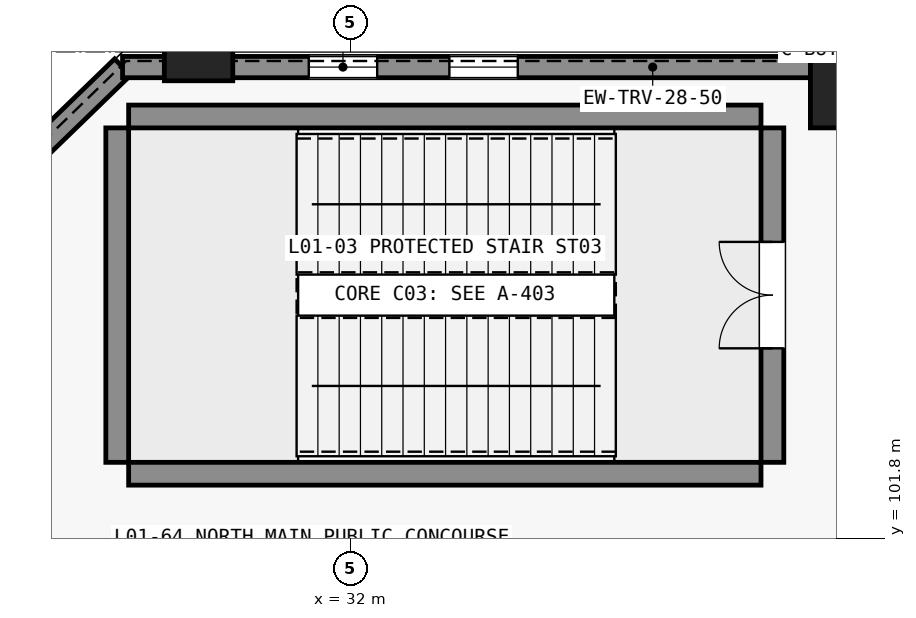
"""IFC4 building model, lengths in metres.
Left out: names, types, materials, properties, quantities, classifications, styles, units other than length and angle.
Written with IfcOpenShell. Run it as: python <this file> out.ifc"""

import sys

from ifc_helpers import new_model, si_unit, direction, frame, frame_2d, origin, origin_2d, place, context, subcontext, project, spatial, rectangle, extrude, element, fill, save


model = new_model("IFC4")
c1 = context("Model", 3, precision=1e-05, world=origin(), true_north=direction((0.0, 1.0)))
c2 = subcontext(c1, "Body", "Model", "MODEL_VIEW")
j1 = project(units=[si_unit("LENGTHUNIT", "METRE"), si_unit("PLANEANGLEUNIT", "RADIAN")], contexts=[c1])
p1 = place(None, origin())
s1 = spatial("IfcSite", under=j1, at=p1, CompositionType="ELEMENT")
p2 = place(p1, origin())
s2 = spatial("IfcBuilding", under=s1, at=p2, CompositionType="ELEMENT")
p3 = place(p2, frame((0.0, 0.0, 6.0)))
s3 = spatial("IfcBuildingStorey", under=s2, at=p3, CompositionType="ELEMENT", Elevation=6.0)
for number, where, z_axis, x_axis in (
    (1, (38.5, 107.8, 0.0), (0.0, 0.0, 1.0), (1.0, 0.0, 0.0)),
    (2, (30.0, 108.42, 0.0), (0.0, 0.0, 1.0), (1.0, 0.0, 0.0)),
):
    element("IfcColumn", number, at=place(p3, frame(where, z_axis=z_axis, x_axis=x_axis)), inside=s3, PredefinedType="PILASTER", context=c2, shape_type="SweptSolid", body=[
        extrude(rectangle(XDim=0.9, YDim=1.2, at=origin_2d()), origin(), (0.0, 0.0, 1.0), 5.4),
    ])
for number, where, z_axis, x_axis in (
    (3, (29.08, 102.65, 0.0), (0.0, 0.0, 1.0), (1.0, 0.0, 0.0)),
    (4, (29.08, 107.35, 0.0), (0.0, 0.0, 1.0), (1.0, 0.0, 0.0)),
):
    element("IfcWall", number, at=place(p3, frame(where, z_axis=z_axis, x_axis=x_axis)), inside=s3, PredefinedType="SHEAR", context=c2, shape_type="SweptSolid", body=[
        extrude(rectangle(XDim=8.32, YDim=0.3, at=frame_2d((4.16, 0.0))), origin(), (0.0, 0.0, 1.0), 5.4),
    ])
p4 = place(p3, frame((28.93, 102.8, 0.0), z_axis=(0.0, 0.0, 1.0), x_axis=(0.0, 1.0, 0.0)))
e5 = element("IfcWall", 5, at=p4, inside=s3, PredefinedType="SHEAR", context=c2, shape_type="SweptSolid", body=[
    extrude(rectangle(XDim=4.4, YDim=0.3, at=frame_2d((2.2, 0.0))), origin(), (0.0, 0.0, 1.0), 5.4),
])
p5 = place(p3, frame((37.55, 102.8, 0.0), z_axis=(0.0, 0.0, 1.0), x_axis=(0.0, 1.0, 0.0)))
e6 = element("IfcWall", 6, at=p5, inside=s3, PredefinedType="SHEAR", context=c2, shape_type="SweptSolid", body=[
    extrude(rectangle(XDim=4.4, YDim=0.3, at=frame_2d((2.2, 0.0))), origin(), (0.0, 0.0, 1.0), 5.4),
])
p6 = place(p5, frame((1.5, 0.0, 0.0)))
e7 = element("IfcOpeningElement", 7, at=p6, cuts=e6, PredefinedType="OPENING", context=c2, shape_type="SweptSolid", body=[
    extrude(rectangle(XDim=1.4, YDim=2.2, at=frame_2d((0.7, 1.1))), frame((0.0, 0.16, 0.0), z_axis=(0.0, -1.0, 0.0), x_axis=(1.0, 0.0, 0.0)), (0.0, 0.0, 1.0), 0.32),
])
p7 = place(p3, frame((29.0, 108.0, 0.0), z_axis=(0.0, 0.0, 1.0), x_axis=(-0.718244287729, -0.695791019736, 0.0)))
e8 = element("IfcWall", 8, at=p7, inside=s3, PredefinedType="STANDARD", context=c2, shape_type="SweptSolid", body=[
    extrude(rectangle(XDim=17.821, YDim=0.3, at=frame_2d((8.911, 0.0))), origin(), (0.0, 0.0, 1.0), 2.775),
])
p8 = place(p3, frame((29.0, 108.0, 0.0), z_axis=(0.0, 0.0, 1.0), x_axis=(1.0, 0.0, 0.0)))
e9 = element("IfcWall", 9, at=p8, inside=s3, PredefinedType="STANDARD", context=c2, shape_type="SweptSolid", body=[
    extrude(rectangle(XDim=13.95, YDim=0.28, at=frame_2d((6.975, 0.0))), origin(), (0.0, 0.0, 1.0), 5.04),
])
p9 = place(p8, frame((2.45, 0.0, 0.95)))
e10 = element("IfcOpeningElement", 10, at=p9, cuts=e9, PredefinedType="OPENING", context=c2, shape_type="SweptSolid", body=[
    extrude(rectangle(XDim=0.9, YDim=2.85, at=frame_2d((0.45, 1.425))), frame((0.0, 0.15, 0.0), z_axis=(0.0, -1.0, 0.0), x_axis=(1.0, 0.0, 0.0)), (0.0, 0.0, 1.0), 0.3),
])
p10 = place(p8, frame((4.3, 0.0, 0.95)))
e11 = element("IfcOpeningElement", 11, at=p10, cuts=e9, PredefinedType="OPENING", context=c2, shape_type="SweptSolid", body=[
    extrude(rectangle(XDim=0.9, YDim=2.85, at=frame_2d((0.45, 1.425))), frame((0.0, 0.15, 0.0), z_axis=(0.0, -1.0, 0.0), x_axis=(1.0, 0.0, 0.0)), (0.0, 0.0, 1.0), 0.3),
])
p11 = place(p9, origin())
e12 = element("IfcWindow", 12, at=p11, inside=s3, PartitioningType="DOUBLE_PANEL_VERTICAL", PredefinedType="WINDOW", context=c2, shape_type="SweptSolid", body=[
    extrude(rectangle(XDim=0.9, YDim=2.85, at=frame_2d((0.45, 1.425))), frame((0.0, 0.03, 0.0), z_axis=(0.0, -1.0, 0.0), x_axis=(1.0, 0.0, 0.0)), (0.0, 0.0, 1.0), 0.06),
])
fill(e10, e12)
p12 = place(p10, origin())
e13 = element("IfcWindow", 13, at=p12, inside=s3, PartitioningType="DOUBLE_PANEL_VERTICAL", PredefinedType="WINDOW", context=c2, shape_type="SweptSolid", body=[
    extrude(rectangle(XDim=0.9, YDim=2.85, at=frame_2d((0.45, 1.425))), frame((0.0, 0.03, 0.0), z_axis=(0.0, -1.0, 0.0), x_axis=(1.0, 0.0, 0.0)), (0.0, 0.0, 1.0), 0.06),
])
fill(e11, e13)
p13 = place(p6, origin())
e14 = element("IfcDoor", 14, at=p13, inside=s3, OperationType="DOUBLE_DOOR_SINGLE_SWING", PredefinedType="DOOR", context=c2, shape_type="SweptSolid", body=[
    extrude(rectangle(XDim=1.4, YDim=2.2, at=frame_2d((0.7, 1.1))), frame((0.0, 0.025, 0.0), z_axis=(0.0, -1.0, 0.0), x_axis=(1.0, 0.0, 0.0)), (0.0, 0.0, 1.0), 0.05),
])
fill(e7, e14)
save(model, sys.argv[1])
